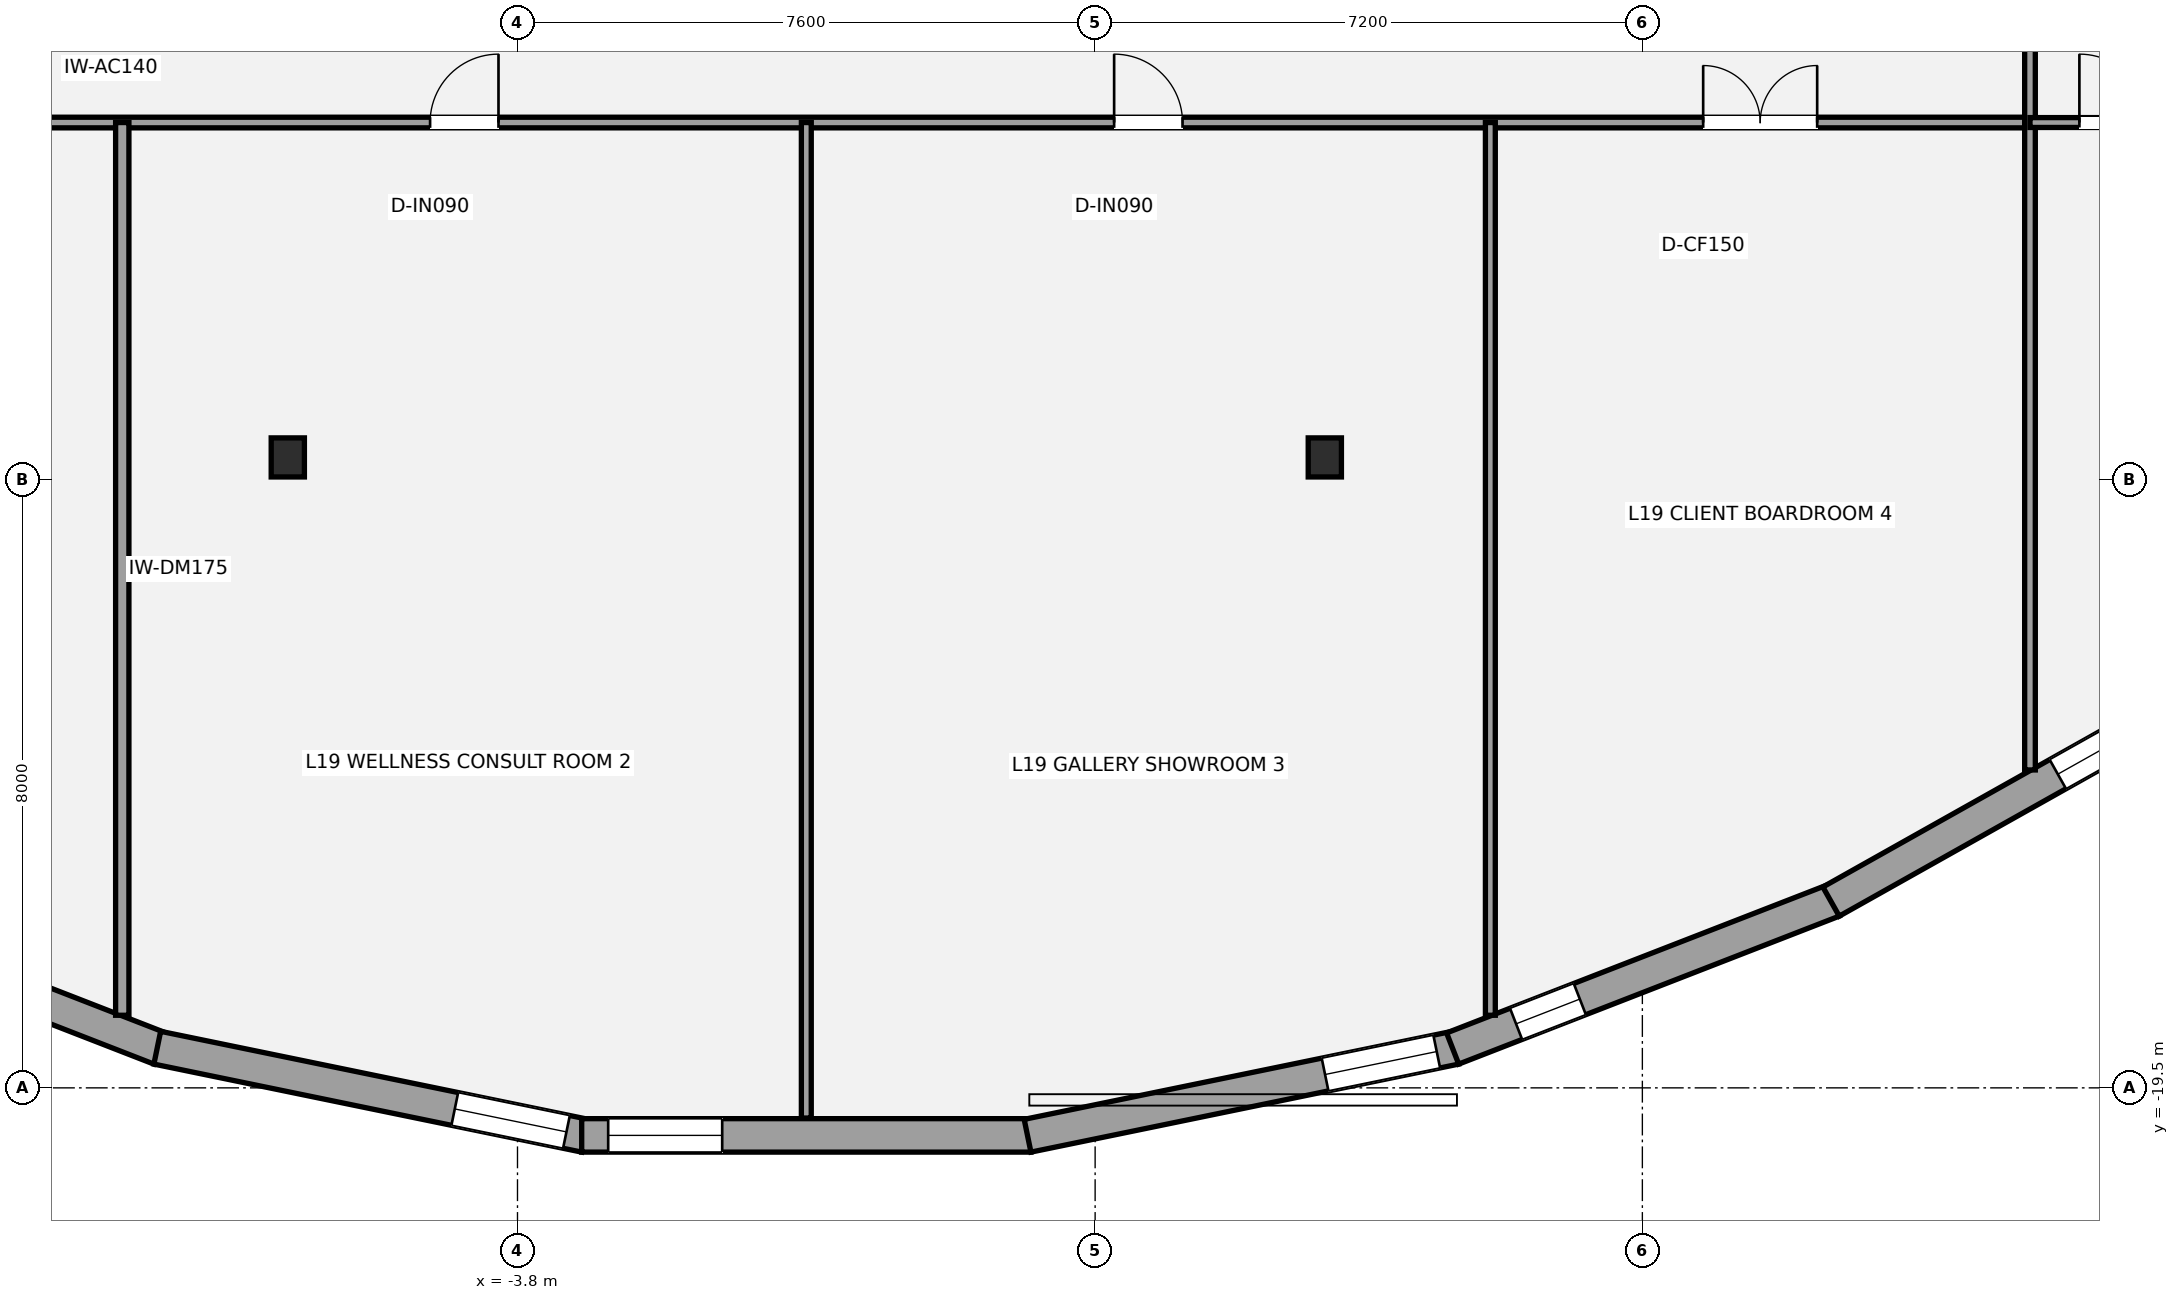
"""IFC4 building model, lengths in metres.
Left out: names, types, materials, properties, quantities, classifications, styles, units other than length and angle.
Written with IfcOpenShell. Run it as: python <this file> out.ifc"""

import sys

from ifc_helpers import new_model, si_unit, direction, frame, frame_2d, origin, origin_2d, place, context, subcontext, project, spatial, rectangle, i_section, extrude, element, fill, save


model = new_model("IFC4")
c1 = context("Model", 3, precision=1e-05, world=origin(), true_north=direction((0.0, 1.0)))
c2 = subcontext(c1, "Body", "Model", "MODEL_VIEW")
j1 = project(units=[si_unit("LENGTHUNIT", "METRE"), si_unit("PLANEANGLEUNIT", "RADIAN")], contexts=[c1])
p1 = place(None, origin())
s1 = spatial("IfcSite", under=j1, at=p1, CompositionType="ELEMENT")
p2 = place(p1, origin())
s2 = spatial("IfcBuilding", under=s1, at=p2, CompositionType="ELEMENT")
p3 = place(p2, frame((0.0, 0.0, 73.8)))
s3 = spatial("IfcBuildingStorey", under=s2, at=p3, CompositionType="ELEMENT", Elevation=73.8)
for number, where, z_axis, x_axis in (
    (1, (-6.822, -11.206, 0.0), (0.0, 0.0, 1.0), (1.0, 0.0, 0.0)),
    (2, (6.822, -11.206, 0.0), (0.0, 0.0, 1.0), (1.0, 0.0, 0.0)),
):
    element("IfcColumn", number, at=place(p3, frame(where, z_axis=z_axis, x_axis=x_axis)), inside=s3, PredefinedType="COLUMN", context=c2, shape_type="SweptSolid", body=[
        extrude(i_section(OverallWidth=0.437, OverallDepth=0.514, WebThickness=0.061, FlangeThickness=0.097, at=origin_2d()), origin(), (0.0, 0.0, 1.0), 3.6),
    ])
p4 = place(p3, frame((-8.504, -18.982, 0.0), z_axis=(0.0, 0.0, 1.0), x_axis=(-0.932040489001, 0.362354145641, 0.0)))
e3 = element("IfcWall", 3, at=p4, inside=s3, PredefinedType="STANDARD", context=c2, shape_type="SweptSolid", body=[
    extrude(rectangle(XDim=5.372, YDim=0.44, at=frame_2d((2.686, 0.0))), origin(), (0.0, 0.0, 1.0), 2.489),
])
p5 = place(p4, frame((3.672, 0.0, 0.48)))
e4 = element("IfcOpeningElement", 4, at=p5, cuts=e3, PredefinedType="OPENING", context=c2, shape_type="SweptSolid", body=[
    extrude(rectangle(XDim=1.5, YDim=1.7, at=frame_2d((0.75, 0.85))), frame((0.0, 0.23, 0.0), z_axis=(0.0, -1.0, 0.0), x_axis=(1.0, 0.0, 0.0)), (0.0, 0.0, 1.0), 0.46),
])
p6 = place(p3, frame((-2.911, -20.13, 0.0), z_axis=(0.0, 0.0, 1.0), x_axis=(-0.979485663347, 0.201513858821, 0.0)))
e5 = element("IfcWall", 5, at=p6, inside=s3, PredefinedType="STANDARD", context=c2, shape_type="SweptSolid", body=[
    extrude(rectangle(XDim=5.746, YDim=0.44, at=frame_2d((2.873, 0.0))), origin(), (0.0, 0.0, 1.0), 2.489),
])
p7 = place(p6, frame((0.25, 0.0, 0.65)))
e6 = element("IfcOpeningElement", 6, at=p7, cuts=e5, PredefinedType="OPENING", context=c2, shape_type="SweptSolid", body=[
    extrude(rectangle(XDim=1.5, YDim=1.7, at=frame_2d((0.75, 0.85))), frame((0.0, 0.23, 0.0), z_axis=(0.0, -1.0, 0.0), x_axis=(1.0, 0.0, 0.0)), (0.0, 0.0, 1.0), 0.46),
])
p8 = place(p3, frame((2.955, -20.125, 0.0), z_axis=(0.0, 0.0, 1.0), x_axis=(-1.0, 0.0, 0.0)))
e7 = element("IfcWall", 7, at=p8, inside=s3, PredefinedType="STANDARD", context=c2, shape_type="SweptSolid", body=[
    extrude(rectangle(XDim=5.91, YDim=0.44, at=frame_2d((2.955, 0.0))), origin(), (0.0, 0.0, 1.0), 2.493),
])
p9 = place(p8, frame((4.062, 0.0, 0.65)))
e8 = element("IfcOpeningElement", 8, at=p9, cuts=e7, PredefinedType="OPENING", context=c2, shape_type="SweptSolid", body=[
    extrude(rectangle(XDim=1.5, YDim=1.7, at=frame_2d((0.75, 0.85))), frame((0.0, 0.23, 0.0), z_axis=(0.0, -1.0, 0.0), x_axis=(1.0, 0.0, 0.0)), (0.0, 0.0, 1.0), 0.46),
])
p10 = place(p3, frame((8.539, -18.972, 0.0), z_axis=(0.0, 0.0, 1.0), x_axis=(-0.979485663347, -0.201513858821, 0.0)))
e9 = element("IfcWall", 9, at=p10, inside=s3, PredefinedType="STANDARD", context=c2, shape_type="SweptSolid", body=[
    extrude(rectangle(XDim=5.746, YDim=0.44, at=frame_2d((2.873, 0.0))), origin(), (0.0, 0.0, 1.0), 2.489),
])
p11 = place(p10, frame((0.25, 0.0, 0.65)))
e10 = element("IfcOpeningElement", 10, at=p11, cuts=e9, PredefinedType="OPENING", context=c2, shape_type="SweptSolid", body=[
    extrude(rectangle(XDim=1.5, YDim=1.7, at=frame_2d((0.75, 0.85))), frame((0.0, 0.23, 0.0), z_axis=(0.0, -1.0, 0.0), x_axis=(1.0, 0.0, 0.0)), (0.0, 0.0, 1.0), 0.46),
])
p12 = place(p3, frame((13.511, -17.036, 0.0), z_axis=(0.0, 0.0, 1.0), x_axis=(-0.932040489001, -0.362354145641, 0.0)))
e11 = element("IfcWall", 11, at=p12, inside=s3, PredefinedType="STANDARD", context=c2, shape_type="SweptSolid", body=[
    extrude(rectangle(XDim=5.372, YDim=0.44, at=frame_2d((2.686, 0.0))), origin(), (0.0, 0.0, 1.0), 2.489),
])
p13 = place(p12, frame((3.577, 0.0, 0.58)))
e12 = element("IfcOpeningElement", 12, at=p13, cuts=e11, PredefinedType="OPENING", context=c2, shape_type="SweptSolid", body=[
    extrude(rectangle(XDim=0.9, YDim=1.35, at=frame_2d((0.45, 0.675))), frame((0.0, 0.23, 0.0), z_axis=(0.0, -1.0, 0.0), x_axis=(1.0, 0.0, 0.0)), (0.0, 0.0, 1.0), 0.46),
])
p14 = place(p3, frame((17.814, -14.616, 0.0), z_axis=(0.0, 0.0, 1.0), x_axis=(-0.871887714573, -0.489705843519, 0.0)))
e13 = element("IfcWall", 13, at=p14, inside=s3, PredefinedType="STANDARD", context=c2, shape_type="SweptSolid", body=[
    extrude(rectangle(XDim=4.968, YDim=0.44, at=frame_2d((2.484, 0.0))), origin(), (0.0, 0.0, 1.0), 2.489),
])
p15 = place(p14, frame((0.646, 0.0, 0.58)))
e14 = element("IfcOpeningElement", 14, at=p15, cuts=e13, PredefinedType="OPENING", context=c2, shape_type="SweptSolid", body=[
    extrude(rectangle(XDim=0.9, YDim=1.35, at=frame_2d((0.45, 0.675))), frame((0.0, 0.23, 0.0), z_axis=(0.0, -1.0, 0.0), x_axis=(1.0, 0.0, 0.0)), (0.0, 0.0, 1.0), 0.46),
])
p16 = place(p3, frame((-18.6, -6.8, 0.0), z_axis=(0.0, 0.0, 1.0), x_axis=(1.0, 0.0, 0.0)))
e15 = element("IfcWall", 15, at=p16, inside=s3, PredefinedType="PARTITIONING", context=c2, shape_type="SweptSolid", body=[
    extrude(rectangle(XDim=34.7, YDim=0.14, at=frame_2d((17.35, 0.0))), origin(), (0.0, 0.0, 1.0), 2.813),
])
p17 = place(p16, frame((4.35, 0.0, 0.0)))
e16 = element("IfcOpeningElement", 16, at=p17, cuts=e15, PredefinedType="OPENING", context=c2, shape_type="SweptSolid", body=[
    extrude(rectangle(XDim=0.9, YDim=2.1, at=frame_2d((0.45, 1.05))), frame((0.0, 0.08, 0.0), z_axis=(0.0, -1.0, 0.0), x_axis=(1.0, 0.0, 0.0)), (0.0, 0.0, 1.0), 0.16),
])
p18 = place(p16, frame((13.65, 0.0, 0.0)))
e17 = element("IfcOpeningElement", 17, at=p18, cuts=e15, PredefinedType="OPENING", context=c2, shape_type="SweptSolid", body=[
    extrude(rectangle(XDim=0.9, YDim=2.1, at=frame_2d((0.45, 1.05))), frame((0.0, 0.08, 0.0), z_axis=(0.0, -1.0, 0.0), x_axis=(1.0, 0.0, 0.0)), (0.0, 0.0, 1.0), 0.16),
])
p19 = place(p16, frame((22.65, 0.0, 0.0)))
e18 = element("IfcOpeningElement", 18, at=p19, cuts=e15, PredefinedType="OPENING", context=c2, shape_type="SweptSolid", body=[
    extrude(rectangle(XDim=0.9, YDim=2.1, at=frame_2d((0.45, 1.05))), frame((0.0, 0.08, 0.0), z_axis=(0.0, -1.0, 0.0), x_axis=(1.0, 0.0, 0.0)), (0.0, 0.0, 1.0), 0.16),
])
p20 = place(p16, frame((30.4, 0.0, 0.0)))
e19 = element("IfcOpeningElement", 19, at=p20, cuts=e15, PredefinedType="OPENING", context=c2, shape_type="SweptSolid", body=[
    extrude(rectangle(XDim=1.5, YDim=2.15, at=frame_2d((0.75, 1.075))), frame((0.0, 0.08, 0.0), z_axis=(0.0, -1.0, 0.0), x_axis=(1.0, 0.0, 0.0)), (0.0, 0.0, 1.0), 0.16),
])
p21 = place(p3, frame((16.1, -15.318, 0.0), z_axis=(0.0, 0.0, 1.0), x_axis=(0.0, 1.0, 0.0)))
e20 = element("IfcWall", 20, at=p21, inside=s3, PredefinedType="PARTITIONING", context=c2, shape_type="SweptSolid", body=[
    extrude(rectangle(XDim=21.168, YDim=0.14, at=frame_2d((10.584, 0.0))), origin(), (0.0, 0.0, 1.0), 2.801),
])
p22 = place(p21, frame((13.068, 0.0, 0.0)))
e21 = element("IfcOpeningElement", 21, at=p22, cuts=e20, PredefinedType="OPENING", context=c2, shape_type="SweptSolid", body=[
    extrude(rectangle(XDim=0.9, YDim=2.1, at=frame_2d((0.45, 1.05))), frame((0.0, 0.08, 0.0), z_axis=(0.0, -1.0, 0.0), x_axis=(1.0, 0.0, 0.0)), (0.0, 0.0, 1.0), 0.16),
])
p23 = place(p21, frame((19.393, 0.0, 0.0)))
e22 = element("IfcOpeningElement", 22, at=p23, cuts=e20, PredefinedType="OPENING", context=c2, shape_type="SweptSolid", body=[
    extrude(rectangle(XDim=0.9, YDim=2.1, at=frame_2d((0.45, 1.05))), frame((0.0, 0.08, 0.0), z_axis=(0.0, -1.0, 0.0), x_axis=(1.0, 0.0, 0.0)), (0.0, 0.0, 1.0), 0.16),
])
p24 = place(p3, frame((-9.0, -18.545, 0.0), z_axis=(0.0, 0.0, 1.0), x_axis=(0.0, 1.0, 0.0)))
e23 = element("IfcWall", 23, at=p24, inside=s3, PredefinedType="PARTITIONING", context=c2, shape_type="SweptSolid", body=[
    extrude(rectangle(XDim=11.745, YDim=0.175, at=frame_2d((5.873, 0.0))), origin(), (0.0, 0.0, 1.0), 2.813),
])
p25 = place(p3, frame((0.0, -19.897, 0.0), z_axis=(0.0, 0.0, 1.0), x_axis=(0.0, 1.0, 0.0)))
e24 = element("IfcWall", 24, at=p25, inside=s3, PredefinedType="PARTITIONING", context=c2, shape_type="SweptSolid", body=[
    extrude(rectangle(XDim=13.097, YDim=0.13, at=frame_2d((6.549, 0.0))), origin(), (0.0, 0.0, 1.0), 2.813),
])
p26 = place(p3, frame((9.0, -18.545, 0.0), z_axis=(0.0, 0.0, 1.0), x_axis=(0.0, 1.0, 0.0)))
e25 = element("IfcWall", 25, at=p26, inside=s3, PredefinedType="PARTITIONING", context=c2, shape_type="SweptSolid", body=[
    extrude(rectangle(XDim=11.745, YDim=0.13, at=frame_2d((5.873, 0.0))), origin(), (0.0, 0.0, 1.0), 2.813),
])
p27 = place(p3, frame((16.1, -6.8, 0.0), z_axis=(0.0, 0.0, 1.0), x_axis=(1.0, 0.0, 0.0)))
e26 = element("IfcWall", 26, at=p27, inside=s3, PredefinedType="PARTITIONING", context=c2, shape_type="SweptSolid", body=[
    extrude(rectangle(XDim=10.781, YDim=0.13, at=frame_2d((5.391, 0.0))), origin(), (0.0, 0.0, 1.0), 2.739),
])
p28 = place(p27, frame((0.65, 0.0, 0.0)))
e27 = element("IfcOpeningElement", 27, at=p28, cuts=e26, PredefinedType="OPENING", context=c2, shape_type="SweptSolid", body=[
    extrude(rectangle(XDim=0.9, YDim=2.1, at=frame_2d((0.45, 1.05))), frame((0.0, 0.075, 0.0), z_axis=(0.0, -1.0, 0.0), x_axis=(1.0, 0.0, 0.0)), (0.0, 0.0, 1.0), 0.15),
])
p29 = place(p7, origin())
e28 = element("IfcWindow", 28, at=p29, inside=s3, PartitioningType="SINGLE_PANEL", PredefinedType="WINDOW", context=c2, shape_type="SweptSolid", body=[
    extrude(rectangle(XDim=1.5, YDim=1.7, at=frame_2d((0.75, 0.85))), frame((0.0, -0.01, 0.0), z_axis=(0.0, -1.0, 0.0), x_axis=(1.0, 0.0, 0.0)), (0.0, 0.0, 1.0), 0.06),
])
fill(e6, e28)
p30 = place(p9, origin())
e29 = element("IfcWindow", 29, at=p30, inside=s3, PartitioningType="SINGLE_PANEL", PredefinedType="WINDOW", context=c2, shape_type="SweptSolid", body=[
    extrude(rectangle(XDim=1.5, YDim=1.7, at=frame_2d((0.75, 0.85))), frame((0.0, -0.01, 0.0), z_axis=(0.0, -1.0, 0.0), x_axis=(1.0, 0.0, 0.0)), (0.0, 0.0, 1.0), 0.06),
])
fill(e8, e29)
p31 = place(p11, origin())
e30 = element("IfcWindow", 30, at=p31, inside=s3, PartitioningType="SINGLE_PANEL", PredefinedType="WINDOW", context=c2, shape_type="SweptSolid", body=[
    extrude(rectangle(XDim=1.5, YDim=1.7, at=frame_2d((0.75, 0.85))), frame((0.0, -0.01, 0.0), z_axis=(0.0, -1.0, 0.0), x_axis=(1.0, 0.0, 0.0)), (0.0, 0.0, 1.0), 0.06),
])
fill(e10, e30)
p32 = place(p13, origin())
e31 = element("IfcWindow", 31, at=p32, inside=s3, PartitioningType="SINGLE_PANEL", PredefinedType="WINDOW", context=c2, shape_type="SweptSolid", body=[
    extrude(rectangle(XDim=0.9, YDim=1.35, at=frame_2d((0.45, 0.675))), frame((0.0, -0.01, 0.0), z_axis=(0.0, -1.0, 0.0), x_axis=(1.0, 0.0, 0.0)), (0.0, 0.0, 1.0), 0.06),
])
fill(e12, e31)
p33 = place(p15, origin())
e32 = element("IfcWindow", 32, at=p33, inside=s3, PartitioningType="SINGLE_PANEL", PredefinedType="WINDOW", context=c2, shape_type="SweptSolid", body=[
    extrude(rectangle(XDim=0.9, YDim=1.35, at=frame_2d((0.45, 0.675))), frame((0.0, -0.01, 0.0), z_axis=(0.0, -1.0, 0.0), x_axis=(1.0, 0.0, 0.0)), (0.0, 0.0, 1.0), 0.06),
])
fill(e14, e32)
p34 = place(p18, origin())
e33 = element("IfcDoor", 33, at=p34, inside=s3, OperationType="SINGLE_SWING_RIGHT", PredefinedType="DOOR", context=c2, shape_type="SweptSolid", body=[
    extrude(rectangle(XDim=0.9, YDim=2.1, at=frame_2d((0.45, 1.05))), frame((0.0, 0.025, 0.0), z_axis=(0.0, -1.0, 0.0), x_axis=(1.0, 0.0, 0.0)), (0.0, 0.0, 1.0), 0.05),
])
fill(e17, e33)
p35 = place(p19, origin())
e34 = element("IfcDoor", 34, at=p35, inside=s3, OperationType="SINGLE_SWING_LEFT", PredefinedType="DOOR", context=c2, shape_type="SweptSolid", body=[
    extrude(rectangle(XDim=0.9, YDim=2.1, at=frame_2d((0.45, 1.05))), frame((0.0, 0.025, 0.0), z_axis=(0.0, -1.0, 0.0), x_axis=(1.0, 0.0, 0.0)), (0.0, 0.0, 1.0), 0.05),
])
fill(e18, e34)
p36 = place(p20, origin())
e35 = element("IfcDoor", 35, at=p36, inside=s3, OperationType="DOUBLE_DOOR_SINGLE_SWING", PredefinedType="DOOR", context=c2, shape_type="SweptSolid", body=[
    extrude(rectangle(XDim=1.5, YDim=2.15, at=frame_2d((0.75, 1.075))), frame((0.0, 0.025, 0.0), z_axis=(0.0, -1.0, 0.0), x_axis=(1.0, 0.0, 0.0)), (0.0, 0.0, 1.0), 0.05),
])
fill(e19, e35)
p37 = place(p28, origin())
e36 = element("IfcDoor", 36, at=p37, inside=s3, OperationType="SINGLE_SWING_LEFT", PredefinedType="DOOR", context=c2, shape_type="SweptSolid", body=[
    extrude(rectangle(XDim=0.9, YDim=2.1, at=frame_2d((0.45, 1.05))), frame((0.0, 0.025, 0.0), z_axis=(0.0, -1.0, 0.0), x_axis=(1.0, 0.0, 0.0)), (0.0, 0.0, 1.0), 0.05),
])
fill(e27, e36)
save(model, sys.argv[1])
